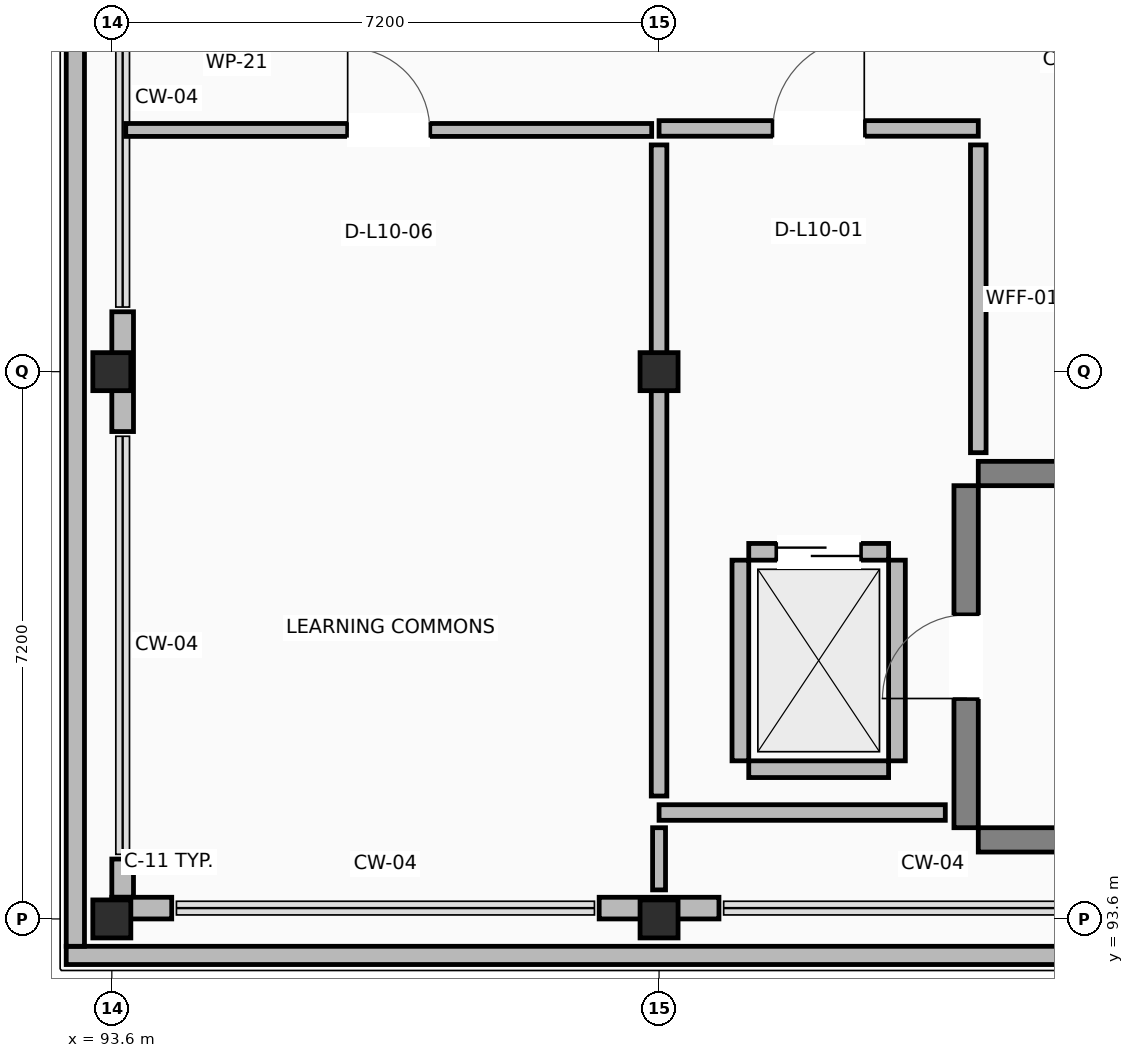
"""IFC4 building model, lengths in metres.
Left out: names, types, materials, properties, quantities, classifications, styles, units other than length and angle.
Written with IfcOpenShell. Run it as: python <this file> out.ifc"""

import sys

from ifc_helpers import new_model, si_unit, direction, frame, frame_2d, origin, origin_2d, place, context, subcontext, project, spatial, rectangle, extrude, element, fill, save


model = new_model("IFC4")
c1 = context("Model", 3, precision=1e-05, world=origin(), true_north=direction((0.0, 1.0)))
c2 = subcontext(c1, "Body", "Model", "MODEL_VIEW")
j1 = project(units=[si_unit("LENGTHUNIT", "METRE"), si_unit("PLANEANGLEUNIT", "RADIAN")], contexts=[c1])
p1 = place(None, origin())
s1 = spatial("IfcSite", under=j1, at=p1, CompositionType="ELEMENT")
p2 = place(p1, origin())
s2 = spatial("IfcBuilding", under=s1, at=p2, CompositionType="ELEMENT")
p3 = place(p2, frame((0.0, 0.0, 43.8)))
s3 = spatial("IfcBuildingStorey", under=s2, at=p3, CompositionType="ELEMENT", Elevation=43.8)
for number, where, z_axis, x_axis in (
    (1, (93.6, 93.6, 0.0), (0.0, 0.0, 1.0), (1.0, 0.0, 0.0)),
    (2, (93.6, 100.8, 0.0), (0.0, 0.0, 1.0), (1.0, 0.0, 0.0)),
    (3, (100.8, 93.6, 0.0), (0.0, 0.0, 1.0), (1.0, 0.0, 0.0)),
    (4, (100.8, 100.8, 0.0), (0.0, 0.0, 1.0), (1.0, 0.0, 0.0)),
):
    element("IfcColumn", number, at=place(p3, frame(where, z_axis=z_axis, x_axis=x_axis)), inside=s3, PredefinedType="COLUMN", context=c2, shape_type="SweptSolid", body=[
        extrude(rectangle(XDim=0.5, YDim=0.5, at=origin_2d()), origin(), (0.0, 0.0, 1.0), 3.92),
    ])
for number, where, z_axis, x_axis in (
    (5, (105.0, 94.64, 0.0), (0.0, 0.0, 1.0), (1.0, 0.0, 0.0)),
    (6, (105.0, 99.46, 0.0), (0.0, 0.0, 1.0), (1.0, 0.0, 0.0)),
):
    element("IfcWall", number, at=place(p3, frame(where, z_axis=z_axis, x_axis=x_axis)), inside=s3, PredefinedType="SHEAR", context=c2, shape_type="SweptSolid", body=[
        extrude(rectangle(XDim=9.5, YDim=0.32, at=frame_2d((4.75, 0.0))), origin(), (0.0, 0.0, 1.0), 3.92),
    ])
p4 = place(p3, frame((104.84, 94.8, 0.0), z_axis=(0.0, 0.0, 1.0), x_axis=(0.0, 1.0, 0.0)))
e7 = element("IfcWall", 7, at=p4, inside=s3, PredefinedType="SHEAR", context=c2, shape_type="SweptSolid", body=[
    extrude(rectangle(XDim=4.5, YDim=0.32, at=frame_2d((2.25, 0.0))), origin(), (0.0, 0.0, 1.0), 3.92),
])
p5 = place(p4, frame((1.7, 0.0, 0.0)))
e8 = element("IfcOpeningElement", 8, at=p5, cuts=e7, PredefinedType="OPENING", context=c2, shape_type="SweptSolid", body=[
    extrude(rectangle(XDim=1.1, YDim=2.15, at=frame_2d((0.55, 1.075))), frame((0.0, 0.17, 0.0), z_axis=(0.0, -1.0, 0.0), x_axis=(1.0, 0.0, 0.0)), (0.0, 0.0, 1.0), 0.34),
])
p6 = place(p3, frame((93.742, 101.588, 0.0), z_axis=(0.0, 0.0, 1.0), x_axis=(0.0, -1.0, 0.0)))
e9 = element("IfcWall", 9, at=p6, inside=s3, PredefinedType="STANDARD", context=c2, shape_type="SweptSolid", body=[
    extrude(rectangle(XDim=1.576, YDim=0.285, at=frame_2d((0.788, 0.0))), origin(), (0.0, 0.0, 1.0), 2.96),
])
p7 = place(p3, frame((93.742, 94.388, 0.0), z_axis=(0.0, 0.0, 1.0), x_axis=(0.0, -1.0, 0.0)))
e10 = element("IfcWall", 10, at=p7, inside=s3, PredefinedType="STANDARD", context=c2, shape_type="SweptSolid", body=[
    extrude(rectangle(XDim=0.503, YDim=0.285, at=frame_2d((0.251, 0.0))), origin(), (0.0, 0.0, 1.0), 2.96),
])
p8 = place(p3, frame((93.6, 93.742, 0.0), z_axis=(0.0, 0.0, 1.0), x_axis=(1.0, 0.0, 0.0)))
e11 = element("IfcWall", 11, at=p8, inside=s3, PredefinedType="STANDARD", context=c2, shape_type="SweptSolid", body=[
    extrude(rectangle(XDim=0.788, YDim=0.285, at=frame_2d((0.394, 0.0))), origin(), (0.0, 0.0, 1.0), 2.96),
])
p9 = place(p3, frame((100.012, 93.742, 0.0), z_axis=(0.0, 0.0, 1.0), x_axis=(1.0, 0.0, 0.0)))
e12 = element("IfcWall", 12, at=p9, inside=s3, PredefinedType="STANDARD", context=c2, shape_type="SweptSolid", body=[
    extrude(rectangle(XDim=1.576, YDim=0.285, at=frame_2d((0.788, 0.0))), origin(), (0.0, 0.0, 1.0), 2.96),
])
p10 = place(p3, frame((136.44, 93.12, 0.0), z_axis=(0.0, 0.0, 1.0), x_axis=(-1.0, 0.0, 0.0)))
e13 = element("IfcWall", 13, at=p10, inside=s3, PredefinedType="PARAPET", context=c2, shape_type="SweptSolid", body=[
    extrude(rectangle(XDim=43.44, YDim=0.24, at=frame_2d((21.72, 0.0))), origin(), (0.0, 0.0, 1.0), 1.12),
])
p11 = place(p3, frame((93.12, 93.24, 0.0), z_axis=(0.0, 0.0, 1.0), x_axis=(0.0, 1.0, 0.0)))
e14 = element("IfcWall", 14, at=p11, inside=s3, PredefinedType="PARAPET", context=c2, shape_type="SweptSolid", body=[
    extrude(rectangle(XDim=22.32, YDim=0.24, at=frame_2d((11.16, 0.0))), origin(), (0.0, 0.0, 1.0), 1.12),
])
p12 = place(p3, frame((101.98, 95.57, 0.0), z_axis=(0.0, 0.0, 1.0), x_axis=(1.0, 0.0, 0.0)))
e15 = element("IfcWall", 15, at=p12, inside=s3, PredefinedType="STANDARD", context=c2, shape_type="SweptSolid", body=[
    extrude(rectangle(XDim=1.84, YDim=0.22, at=frame_2d((0.92, 0.0))), origin(), (0.0, 0.0, 1.0), 2.96),
])
p13 = place(p3, frame((101.98, 98.43, 0.0), z_axis=(0.0, 0.0, 1.0), x_axis=(1.0, 0.0, 0.0)))
e16 = element("IfcWall", 16, at=p13, inside=s3, PredefinedType="STANDARD", context=c2, shape_type="SweptSolid", body=[
    extrude(rectangle(XDim=1.84, YDim=0.22, at=frame_2d((0.92, 0.0))), origin(), (0.0, 0.0, 1.0), 2.96),
])
p14 = place(p13, frame((0.37, 0.0, 0.0)))
e17 = element("IfcOpeningElement", 17, at=p14, cuts=e16, PredefinedType="OPENING", context=c2, shape_type="SweptSolid", body=[
    extrude(rectangle(XDim=1.1, YDim=2.15, at=frame_2d((0.55, 1.075))), frame((0.0, 0.12, 0.0), z_axis=(0.0, -1.0, 0.0), x_axis=(1.0, 0.0, 0.0)), (0.0, 0.0, 1.0), 0.24),
])
for number, where, z_axis, x_axis in (
    (18, (101.87, 95.68, 0.0), (0.0, 0.0, 1.0), (0.0, 1.0, 0.0)),
    (19, (103.93, 95.68, 0.0), (0.0, 0.0, 1.0), (0.0, 1.0, 0.0)),
):
    element("IfcWall", number, at=place(p3, frame(where, z_axis=z_axis, x_axis=x_axis)), inside=s3, PredefinedType="STANDARD", context=c2, shape_type="SweptSolid", body=[
        extrude(rectangle(XDim=2.64, YDim=0.22, at=frame_2d((1.32, 0.0))), origin(), (0.0, 0.0, 1.0), 2.96),
    ])
p15 = place(p3, frame((100.8, 104.0, 0.0), z_axis=(0.0, 0.0, 1.0), x_axis=(1.0, 0.0, 0.0)))
e20 = element("IfcWall", 20, at=p15, inside=s3, PredefinedType="PARTITIONING", context=c2, shape_type="SweptSolid", body=[
    extrude(rectangle(XDim=4.2, YDim=0.205, at=frame_2d((2.1, 0.0))), origin(), (0.0, 0.0, 1.0), 2.96),
])
p16 = place(p15, frame((1.5, 0.0, 0.0)))
e21 = element("IfcOpeningElement", 21, at=p16, cuts=e20, PredefinedType="OPENING", context=c2, shape_type="SweptSolid", body=[
    extrude(rectangle(XDim=1.2, YDim=2.15, at=frame_2d((0.6, 1.075))), frame((0.0, 0.113, 0.0), z_axis=(0.0, -1.0, 0.0), x_axis=(1.0, 0.0, 0.0)), (0.0, 0.0, 1.0), 0.225),
])
p17 = place(p3, frame((105.0, 103.783, 0.0), z_axis=(0.0, 0.0, 1.0), x_axis=(0.0, -1.0, 0.0)))
e22 = element("IfcWall", 22, at=p17, inside=s3, PredefinedType="PARTITIONING", context=c2, shape_type="SweptSolid", body=[
    extrude(rectangle(XDim=4.049, YDim=0.205, at=frame_2d((2.024, 0.0))), origin(), (0.0, 0.0, 1.0), 2.96),
])
p18 = place(p3, frame((104.566, 95.0, 0.0), z_axis=(0.0, 0.0, 1.0), x_axis=(-1.0, 0.0, 0.0)))
e23 = element("IfcWall", 23, at=p18, inside=s3, PredefinedType="PARTITIONING", context=c2, shape_type="SweptSolid", body=[
    extrude(rectangle(XDim=3.766, YDim=0.205, at=frame_2d((1.883, 0.0))), origin(), (0.0, 0.0, 1.0), 2.96),
])
p19 = place(p3, frame((100.8, 95.217, 0.0), z_axis=(0.0, 0.0, 1.0), x_axis=(0.0, 1.0, 0.0)))
e24 = element("IfcWall", 24, at=p19, inside=s3, PredefinedType="PARTITIONING", context=c2, shape_type="SweptSolid", body=[
    extrude(rectangle(XDim=8.566, YDim=0.205, at=frame_2d((4.283, 0.0))), origin(), (0.0, 0.0, 1.0), 2.96),
])
p20 = place(p3, frame((93.783, 103.98, 0.0), z_axis=(0.0, 0.0, 1.0), x_axis=(1.0, 0.0, 0.0)))
e25 = element("IfcWall", 25, at=p20, inside=s3, PredefinedType="PARTITIONING", context=c2, shape_type="SweptSolid", body=[
    extrude(rectangle(XDim=6.92, YDim=0.17, at=frame_2d((3.46, 0.0))), origin(), (0.0, 0.0, 1.0), 2.96),
])
p21 = place(p20, frame((2.92, 0.0, 0.0)))
e26 = element("IfcOpeningElement", 26, at=p21, cuts=e25, PredefinedType="OPENING", context=c2, shape_type="SweptSolid", body=[
    extrude(rectangle(XDim=1.08, YDim=2.15, at=frame_2d((0.54, 1.075))), frame((0.0, 0.095, 0.0), z_axis=(0.0, -1.0, 0.0), x_axis=(1.0, 0.0, 0.0)), (0.0, 0.0, 1.0), 0.19),
])
p22 = place(p3, frame((100.8, 94.8, 0.0), z_axis=(0.0, 0.0, 1.0), x_axis=(0.0, -1.0, 0.0)))
e27 = element("IfcWall", 27, at=p22, inside=s3, PredefinedType="PARTITIONING", context=c2, shape_type="SweptSolid", body=[
    extrude(rectangle(XDim=0.818, YDim=0.17, at=frame_2d((0.409, 0.0))), origin(), (0.0, 0.0, 1.0), 2.96),
])
p23 = place(p5, origin())
e28 = element("IfcDoor", 28, at=p23, inside=s3, OperationType="SINGLE_SWING_LEFT", PredefinedType="DOOR", context=c2, shape_type="SweptSolid", body=[
    extrude(rectangle(XDim=1.1, YDim=2.15, at=frame_2d((0.55, 1.075))), frame((0.0, 0.025, 0.0), z_axis=(0.0, -1.0, 0.0), x_axis=(1.0, 0.0, 0.0)), (0.0, 0.0, 1.0), 0.05),
])
fill(e8, e28)
p24 = place(p14, origin())
e29 = element("IfcDoor", 29, at=p24, inside=s3, OperationType="SLIDING_TO_LEFT", PredefinedType="DOOR", context=c2, shape_type="SweptSolid", body=[
    extrude(rectangle(XDim=1.1, YDim=2.15, at=frame_2d((0.55, 1.075))), frame((0.0, 0.025, 0.0), z_axis=(0.0, -1.0, 0.0), x_axis=(1.0, 0.0, 0.0)), (0.0, 0.0, 1.0), 0.05),
])
fill(e17, e29)
p25 = place(p16, origin())
e30 = element("IfcDoor", 30, at=p25, inside=s3, OperationType="SINGLE_SWING_RIGHT", PredefinedType="DOOR", context=c2, shape_type="SweptSolid", body=[
    extrude(rectangle(XDim=1.2, YDim=2.15, at=frame_2d((0.6, 1.075))), frame((0.0, 0.025, 0.0), z_axis=(0.0, -1.0, 0.0), x_axis=(1.0, 0.0, 0.0)), (0.0, 0.0, 1.0), 0.05),
])
fill(e21, e30)
p26 = place(p21, origin())
e31 = element("IfcDoor", 31, at=p26, inside=s3, OperationType="SINGLE_SWING_LEFT", PredefinedType="DOOR", context=c2, shape_type="SweptSolid", body=[
    extrude(rectangle(XDim=1.08, YDim=2.15, at=frame_2d((0.54, 1.075))), frame((0.0, 0.025, 0.0), z_axis=(0.0, -1.0, 0.0), x_axis=(1.0, 0.0, 0.0)), (0.0, 0.0, 1.0), 0.05),
])
fill(e26, e31)
save(model, sys.argv[1])
